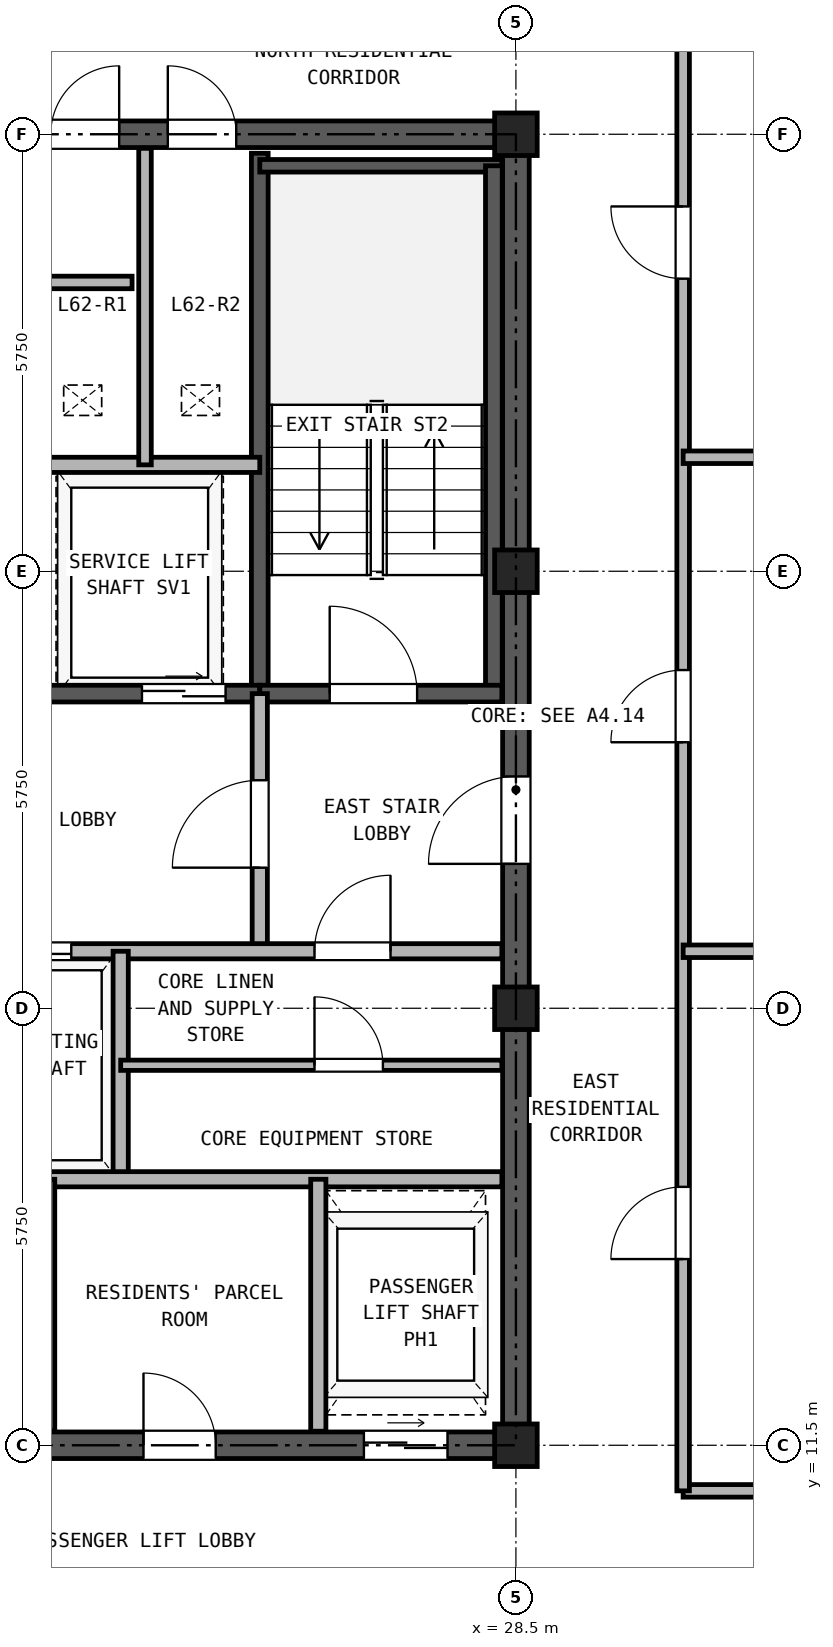
"""IFC4 building model, lengths in metres.
Left out: names, types, materials, properties, quantities, classifications, styles, units other than length and angle.
Written with IfcOpenShell. Run it as: python <this file> out.ifc"""

import sys

from ifc_helpers import new_model, si_unit, direction, frame, frame_2d, origin, origin_2d, place, context, subcontext, project, spatial, rectangle, hollow_rectangle, extrude, source, transform, mapped, element, fill, save


model = new_model("IFC4")
c1 = context("Model", 3, precision=1e-05, world=origin(), true_north=direction((0.0, 1.0)))
c2 = subcontext(c1, "Body", "Model", "MODEL_VIEW")
j1 = project(units=[si_unit("LENGTHUNIT", "METRE"), si_unit("PLANEANGLEUNIT", "RADIAN")], contexts=[c1])
p1 = place(None, origin())
s1 = spatial("IfcSite", under=j1, at=p1, CompositionType="ELEMENT")
p2 = place(p1, origin())
s2 = spatial("IfcBuilding", under=s1, at=p2, CompositionType="ELEMENT")
p3 = place(p2, frame((0.0, 0.0, 220.1)))
s3 = spatial("IfcBuildingStorey", under=s2, at=p3, CompositionType="ELEMENT", Elevation=220.1)
m1 = source(origin(), c2, "Body", "SweptSolid", [
    extrude(hollow_rectangle(XDim=0.56, YDim=0.56, WallThickness=0.03, at=origin_2d()), origin(), (0.0, 0.0, 1.0), 2.98),
])
for number, where, z_axis, x_axis in (
    (1, (28.5, 11.5, 0.0), (0.0, 0.0, 1.0), (1.0, 0.0, 0.0)),
    (2, (28.5, 17.25, 0.0), (0.0, 0.0, 1.0), (1.0, 0.0, 0.0)),
    (3, (28.5, 23.0, 0.0), (0.0, 0.0, 1.0), (1.0, 0.0, 0.0)),
    (4, (28.5, 28.75, 0.0), (0.0, 0.0, 1.0), (1.0, 0.0, 0.0)),
):
    element("IfcColumn", number, at=place(p3, frame(where, z_axis=z_axis, x_axis=x_axis)), inside=s3, PredefinedType="COLUMN", context=c2, shape_type="MappedRepresentation", body=[
        mapped(m1, transform((0.0, 0.0, 0.0), x_axis=(1.0, 0.0, 0.0), y_axis=(0.0, 1.0, 0.0), z_axis=(0.0, 0.0, 1.0), scale=1.0)),
    ])
p4 = place(p3, frame((18.325, 11.5, 0.0), z_axis=(0.0, 0.0, 1.0), x_axis=(1.0, 0.0, 0.0)))
e5 = element("IfcWall", 5, at=p4, inside=s3, PredefinedType="SHEAR", context=c2, shape_type="SweptSolid", body=[
    extrude(rectangle(XDim=10.35, YDim=0.35, at=frame_2d((5.175, 0.0))), origin(), (0.0, 0.0, 1.0), 2.98),
])
p5 = place(p4, frame((1.775, 0.0, 0.0)))
e6 = element("IfcOpeningElement", 6, at=p5, cuts=e5, PredefinedType="OPENING", context=c2, shape_type="SweptSolid", body=[
    extrude(rectangle(XDim=0.95, YDim=2.15, at=frame_2d((0.475, 1.075))), frame((0.0, 0.185, 0.0), z_axis=(0.0, -1.0, 0.0), x_axis=(1.0, 0.0, 0.0)), (0.0, 0.0, 1.0), 0.37),
])
p6 = place(p4, frame((5.275, 0.0, 0.0)))
e7 = element("IfcOpeningElement", 7, at=p6, cuts=e5, PredefinedType="OPENING", context=c2, shape_type="SweptSolid", body=[
    extrude(rectangle(XDim=0.95, YDim=2.15, at=frame_2d((0.475, 1.075))), frame((0.0, 0.185, 0.0), z_axis=(0.0, -1.0, 0.0), x_axis=(1.0, 0.0, 0.0)), (0.0, 0.0, 1.0), 0.37),
])
p7 = place(p4, frame((8.175, 0.0, 0.0)))
e8 = element("IfcOpeningElement", 8, at=p7, cuts=e5, PredefinedType="OPENING", context=c2, shape_type="SweptSolid", body=[
    extrude(rectangle(XDim=1.1, YDim=2.25, at=frame_2d((0.55, 1.125))), frame((0.0, 0.185, 0.0), z_axis=(0.0, -1.0, 0.0), x_axis=(1.0, 0.0, 0.0)), (0.0, 0.0, 1.0), 0.37),
])
p8 = place(p3, frame((18.325, 28.75, 0.0), z_axis=(0.0, 0.0, 1.0), x_axis=(1.0, 0.0, 0.0)))
e9 = element("IfcWall", 9, at=p8, inside=s3, PredefinedType="SHEAR", context=c2, shape_type="SweptSolid", body=[
    extrude(rectangle(XDim=10.35, YDim=0.35, at=frame_2d((5.175, 0.0))), origin(), (0.0, 0.0, 1.0), 2.98),
])
p9 = place(p8, frame((4.055, 0.0, 0.0)))
e10 = element("IfcOpeningElement", 10, at=p9, cuts=e9, PredefinedType="OPENING", context=c2, shape_type="SweptSolid", body=[
    extrude(rectangle(XDim=0.9, YDim=2.05, at=frame_2d((0.45, 1.025))), frame((0.0, 0.185, 0.0), z_axis=(0.0, -1.0, 0.0), x_axis=(1.0, 0.0, 0.0)), (0.0, 0.0, 1.0), 0.37),
])
p10 = place(p8, frame((5.595, 0.0, 0.0)))
e11 = element("IfcOpeningElement", 11, at=p10, cuts=e9, PredefinedType="OPENING", context=c2, shape_type="SweptSolid", body=[
    extrude(rectangle(XDim=0.9, YDim=2.05, at=frame_2d((0.45, 1.025))), frame((0.0, 0.185, 0.0), z_axis=(0.0, -1.0, 0.0), x_axis=(1.0, 0.0, 0.0)), (0.0, 0.0, 1.0), 0.37),
])
p11 = place(p3, frame((28.5, 11.675, 0.0), z_axis=(0.0, 0.0, 1.0), x_axis=(0.0, 1.0, 0.0)))
e12 = element("IfcWall", 12, at=p11, inside=s3, PredefinedType="SHEAR", context=c2, shape_type="SweptSolid", body=[
    extrude(rectangle(XDim=16.9, YDim=0.35, at=frame_2d((8.45, 0.0))), origin(), (0.0, 0.0, 1.0), 2.98),
])
p12 = place(p11, frame((7.475, 0.0, 0.0)))
e13 = element("IfcOpeningElement", 13, at=p12, cuts=e12, PredefinedType="OPENING", context=c2, shape_type="SweptSolid", body=[
    extrude(rectangle(XDim=1.15, YDim=2.2, at=frame_2d((0.575, 1.1))), frame((0.0, 0.185, 0.0), z_axis=(0.0, -1.0, 0.0), x_axis=(1.0, 0.0, 0.0)), (0.0, 0.0, 1.0), 0.37),
])
p13 = place(p3, frame((25.13, 21.39, 0.0), z_axis=(0.0, 0.0, 1.0), x_axis=(0.0, 1.0, 0.0)))
e14 = element("IfcWall", 14, at=p13, inside=s3, PredefinedType="SOLIDWALL", context=c2, shape_type="SweptSolid", body=[
    extrude(rectangle(XDim=7.11, YDim=0.22, at=frame_2d((3.555, 0.0))), origin(), (0.0, 0.0, 1.0), 2.98),
])
p14 = place(p3, frame((25.13, 28.335, 0.0), z_axis=(0.0, 0.0, 1.0), x_axis=(1.0, 0.0, 0.0)))
e15 = element("IfcWall", 15, at=p14, inside=s3, PredefinedType="PARTITIONING", context=c2, shape_type="SweptSolid", body=[
    extrude(rectangle(XDim=3.185, YDim=0.165, at=frame_2d((1.593, 0.0))), origin(), (0.0, 0.0, 1.0), 2.98),
])
p15 = place(p3, frame((28.21, 21.39, 0.0), z_axis=(0.0, 0.0, 1.0), x_axis=(0.0, 1.0, 0.0)))
e16 = element("IfcWall", 16, at=p15, inside=s3, PredefinedType="SOLIDWALL", context=c2, shape_type="SweptSolid", body=[
    extrude(rectangle(XDim=6.945, YDim=0.22, at=frame_2d((3.473, 0.0))), origin(), (0.0, 0.0, 1.0), 2.98),
])
p16 = place(p3, frame((18.685, 21.39, 0.0), z_axis=(0.0, 0.0, 1.0), x_axis=(1.0, 0.0, 0.0)))
e17 = element("IfcWall", 17, at=p16, inside=s3, PredefinedType="SOLIDWALL", context=c2, shape_type="SweptSolid", body=[
    extrude(rectangle(XDim=6.445, YDim=0.22, at=frame_2d((3.222, 0.0))), origin(), (0.0, 0.0, 1.0), 2.98),
])
p17 = place(p16, frame((1.165, 0.0, 0.0)))
e18 = element("IfcOpeningElement", 18, at=p17, cuts=e17, PredefinedType="OPENING", context=c2, shape_type="SweptSolid", body=[
    extrude(rectangle(XDim=1.15, YDim=2.2, at=frame_2d((0.575, 1.1))), frame((0.0, 0.12, 0.0), z_axis=(0.0, -1.0, 0.0), x_axis=(1.0, 0.0, 0.0)), (0.0, 0.0, 1.0), 0.24),
])
p18 = place(p16, frame((4.895, 0.0, 0.0)))
e19 = element("IfcOpeningElement", 19, at=p18, cuts=e17, PredefinedType="OPENING", context=c2, shape_type="SweptSolid", body=[
    extrude(rectangle(XDim=1.1, YDim=2.25, at=frame_2d((0.55, 1.125))), frame((0.0, 0.12, 0.0), z_axis=(0.0, -1.0, 0.0), x_axis=(1.0, 0.0, 0.0)), (0.0, 0.0, 1.0), 0.24),
])
p19 = place(p3, frame((25.13, 21.39, 0.0), z_axis=(0.0, 0.0, 1.0), x_axis=(1.0, 0.0, 0.0)))
e20 = element("IfcWall", 20, at=p19, inside=s3, PredefinedType="SOLIDWALL", context=c2, shape_type="SweptSolid", body=[
    extrude(rectangle(XDim=3.185, YDim=0.22, at=frame_2d((1.593, 0.0))), origin(), (0.0, 0.0, 1.0), 2.98),
])
p20 = place(p19, frame((0.92, 0.0, 0.0)))
e21 = element("IfcOpeningElement", 21, at=p20, cuts=e20, PredefinedType="OPENING", context=c2, shape_type="SweptSolid", body=[
    extrude(rectangle(XDim=1.15, YDim=2.2, at=frame_2d((0.575, 1.1))), frame((0.0, 0.12, 0.0), z_axis=(0.0, -1.0, 0.0), x_axis=(1.0, 0.0, 0.0)), (0.0, 0.0, 1.0), 0.24),
])
p21 = place(p3, frame((22.11, 24.4, 0.0), z_axis=(0.0, 0.0, 1.0), x_axis=(1.0, 0.0, 0.0)))
e22 = element("IfcWall", 22, at=p21, inside=s3, PredefinedType="PARTITIONING", context=c2, shape_type="SweptSolid", body=[
    extrude(rectangle(XDim=3.02, YDim=0.2, at=frame_2d((1.51, 0.0))), origin(), (0.0, 0.0, 1.0), 2.98),
])
p22 = place(p3, frame((23.62, 24.4, 0.0), z_axis=(0.0, 0.0, 1.0), x_axis=(0.0, 1.0, 0.0)))
e23 = element("IfcWall", 23, at=p22, inside=s3, PredefinedType="PARTITIONING", context=c2, shape_type="SweptSolid", body=[
    extrude(rectangle(XDim=4.165, YDim=0.165, at=frame_2d((2.083, 0.0))), origin(), (0.0, 0.0, 1.0), 2.98),
])
p23 = place(p3, frame((25.13, 18.0, 0.0), z_axis=(0.0, 0.0, 1.0), x_axis=(0.0, 1.0, 0.0)))
e24 = element("IfcWall", 24, at=p23, inside=s3, PredefinedType="PARTITIONING", context=c2, shape_type="SweptSolid", body=[
    extrude(rectangle(XDim=3.39, YDim=0.2, at=frame_2d((1.695, 0.0))), origin(), (0.0, 0.0, 1.0), 2.98),
])
p24 = place(p23, frame((1.1, 0.0, 0.0)))
e25 = element("IfcOpeningElement", 25, at=p24, cuts=e24, PredefinedType="OPENING", context=c2, shape_type="SweptSolid", body=[
    extrude(rectangle(XDim=1.15, YDim=2.2, at=frame_2d((0.575, 1.1))), frame((0.0, 0.11, 0.0), z_axis=(0.0, -1.0, 0.0), x_axis=(1.0, 0.0, 0.0)), (0.0, 0.0, 1.0), 0.22),
])
p25 = place(p3, frame((18.685, 18.0, 0.0), z_axis=(0.0, 0.0, 1.0), x_axis=(1.0, 0.0, 0.0)))
e26 = element("IfcWall", 26, at=p25, inside=s3, PredefinedType="PARTITIONING", context=c2, shape_type="SweptSolid", body=[
    extrude(rectangle(XDim=9.63, YDim=0.2, at=frame_2d((4.815, 0.0))), origin(), (0.0, 0.0, 1.0), 2.98),
])
p26 = place(p25, frame((0.565, 0.0, 0.0)))
e27 = element("IfcOpeningElement", 27, at=p26, cuts=e26, PredefinedType="OPENING", context=c2, shape_type="SweptSolid", body=[
    extrude(rectangle(XDim=1.3, YDim=2.3, at=frame_2d((0.65, 1.15))), frame((0.0, 0.11, 0.0), z_axis=(0.0, -1.0, 0.0), x_axis=(1.0, 0.0, 0.0)), (0.0, 0.0, 1.0), 0.22),
])
p27 = place(p25, frame((2.665, 0.0, 0.0)))
e28 = element("IfcOpeningElement", 28, at=p27, cuts=e26, PredefinedType="OPENING", context=c2, shape_type="SweptSolid", body=[
    extrude(rectangle(XDim=1.3, YDim=2.3, at=frame_2d((0.65, 1.15))), frame((0.0, 0.11, 0.0), z_axis=(0.0, -1.0, 0.0), x_axis=(1.0, 0.0, 0.0)), (0.0, 0.0, 1.0), 0.22),
])
p28 = place(p25, frame((7.165, 0.0, 0.0)))
e29 = element("IfcOpeningElement", 29, at=p28, cuts=e26, PredefinedType="OPENING", context=c2, shape_type="SweptSolid", body=[
    extrude(rectangle(XDim=1.0, YDim=2.15, at=frame_2d((0.5, 1.075))), frame((0.0, 0.11, 0.0), z_axis=(0.0, -1.0, 0.0), x_axis=(1.0, 0.0, 0.0)), (0.0, 0.0, 1.0), 0.22),
])
p29 = place(p3, frame((23.3, 15.0, 0.0), z_axis=(0.0, 0.0, 1.0), x_axis=(0.0, 1.0, 0.0)))
e30 = element("IfcWall", 30, at=p29, inside=s3, PredefinedType="PARTITIONING", context=c2, shape_type="SweptSolid", body=[
    extrude(rectangle(XDim=3.0, YDim=0.2, at=frame_2d((1.5, 0.0))), origin(), (0.0, 0.0, 1.0), 2.98),
])
p30 = place(p3, frame((18.685, 15.0, 0.0), z_axis=(0.0, 0.0, 1.0), x_axis=(1.0, 0.0, 0.0)))
e31 = element("IfcWall", 31, at=p30, inside=s3, PredefinedType="PARTITIONING", context=c2, shape_type="SweptSolid", body=[
    extrude(rectangle(XDim=9.63, YDim=0.2, at=frame_2d((4.815, 0.0))), origin(), (0.0, 0.0, 1.0), 2.98),
])
p31 = place(p3, frame((23.3, 16.5, 0.0), z_axis=(0.0, 0.0, 1.0), x_axis=(1.0, 0.0, 0.0)))
e32 = element("IfcWall", 32, at=p31, inside=s3, PredefinedType="PARTITIONING", context=c2, shape_type="SweptSolid", body=[
    extrude(rectangle(XDim=5.015, YDim=0.135, at=frame_2d((2.507, 0.0))), origin(), (0.0, 0.0, 1.0), 2.98),
])
p32 = place(p31, frame((2.55, 0.0, 0.0)))
e33 = element("IfcOpeningElement", 33, at=p32, cuts=e32, PredefinedType="OPENING", context=c2, shape_type="SweptSolid", body=[
    extrude(rectangle(XDim=0.9, YDim=2.05, at=frame_2d((0.45, 1.025))), frame((0.0, 0.077, 0.0), z_axis=(0.0, -1.0, 0.0), x_axis=(1.0, 0.0, 0.0)), (0.0, 0.0, 1.0), 0.155),
])
p33 = place(p3, frame((22.35, 11.685, 0.0), z_axis=(0.0, 0.0, 1.0), x_axis=(0.0, 1.0, 0.0)))
e34 = element("IfcWall", 34, at=p33, inside=s3, PredefinedType="PARTITIONING", context=c2, shape_type="SweptSolid", body=[
    extrude(rectangle(XDim=3.315, YDim=0.165, at=frame_2d((1.657, 0.0))), origin(), (0.0, 0.0, 1.0), 2.98),
])
p34 = place(p3, frame((25.9, 11.685, 0.0), z_axis=(0.0, 0.0, 1.0), x_axis=(0.0, 1.0, 0.0)))
e35 = element("IfcWall", 35, at=p34, inside=s3, PredefinedType="PARTITIONING", context=c2, shape_type="SweptSolid", body=[
    extrude(rectangle(XDim=3.315, YDim=0.2, at=frame_2d((1.657, 0.0))), origin(), (0.0, 0.0, 1.0), 2.98),
])
p35 = place(p3, frame((30.7, 10.9, 0.0), z_axis=(0.0, 0.0, 1.0), x_axis=(1.0, 0.0, 0.0)))
e36 = element("IfcWall", 36, at=p35, inside=s3, PredefinedType="PARTITIONING", context=c2, shape_type="SweptSolid", body=[
    extrude(rectangle(XDim=7.5, YDim=0.165, at=frame_2d((3.75, 0.0))), origin(), (0.0, 0.0, 1.0), 2.98),
])
p36 = place(p3, frame((30.7, 10.9, 0.0), z_axis=(0.0, 0.0, 1.0), x_axis=(0.0, 1.0, 0.0)))
e37 = element("IfcWall", 37, at=p36, inside=s3, PredefinedType="PARTITIONING", context=c2, shape_type="SweptSolid", body=[
    extrude(rectangle(XDim=24.24, YDim=0.165, at=frame_2d((12.12, 0.0))), origin(), (0.0, 0.0, 1.0), 2.98),
])
p37 = place(p36, frame((3.05, 0.0, 0.0)))
e38 = element("IfcOpeningElement", 38, at=p37, cuts=e37, PredefinedType="OPENING", context=c2, shape_type="SweptSolid", body=[
    extrude(rectangle(XDim=0.95, YDim=2.15, at=frame_2d((0.475, 1.075))), frame((0.0, 0.093, 0.0), z_axis=(0.0, -1.0, 0.0), x_axis=(1.0, 0.0, 0.0)), (0.0, 0.0, 1.0), 0.185),
])
p38 = place(p36, frame((9.85, 0.0, 0.0)))
e39 = element("IfcOpeningElement", 39, at=p38, cuts=e37, PredefinedType="OPENING", context=c2, shape_type="SweptSolid", body=[
    extrude(rectangle(XDim=0.95, YDim=2.15, at=frame_2d((0.475, 1.075))), frame((0.0, 0.093, 0.0), z_axis=(0.0, -1.0, 0.0), x_axis=(1.0, 0.0, 0.0)), (0.0, 0.0, 1.0), 0.185),
])
p39 = place(p36, frame((15.95, 0.0, 0.0)))
e40 = element("IfcOpeningElement", 40, at=p39, cuts=e37, PredefinedType="OPENING", context=c2, shape_type="SweptSolid", body=[
    extrude(rectangle(XDim=0.95, YDim=2.15, at=frame_2d((0.475, 1.075))), frame((0.0, 0.093, 0.0), z_axis=(0.0, -1.0, 0.0), x_axis=(1.0, 0.0, 0.0)), (0.0, 0.0, 1.0), 0.185),
])
p40 = place(p36, frame((21.27, 0.0, 0.0)))
e41 = element("IfcOpeningElement", 41, at=p40, cuts=e37, PredefinedType="OPENING", context=c2, shape_type="SweptSolid", body=[
    extrude(rectangle(XDim=0.95, YDim=2.15, at=frame_2d((0.475, 1.075))), frame((0.0, 0.093, 0.0), z_axis=(0.0, -1.0, 0.0), x_axis=(1.0, 0.0, 0.0)), (0.0, 0.0, 1.0), 0.185),
])
for number, where, z_axis, x_axis in (
    (42, (30.7, 18.0, 0.0), (0.0, 0.0, 1.0), (1.0, 0.0, 0.0)),
    (43, (30.7, 24.5, 0.0), (0.0, 0.0, 1.0), (1.0, 0.0, 0.0)),
):
    element("IfcWall", number, at=place(p3, frame(where, z_axis=z_axis, x_axis=x_axis)), inside=s3, PredefinedType="PARTITIONING", context=c2, shape_type="SweptSolid", body=[
        extrude(rectangle(XDim=10.94, YDim=0.165, at=frame_2d((5.47, 0.0))), origin(), (0.0, 0.0, 1.0), 2.98),
    ])
p41 = place(p3, frame((22.35, 26.8, 0.0), z_axis=(0.0, 0.0, 1.0), x_axis=(1.0, 0.0, 0.0)))
e44 = element("IfcWall", 44, at=p41, inside=s3, PredefinedType="PARTITIONING", context=c2, shape_type="SweptSolid", body=[
    extrude(rectangle(XDim=1.1, YDim=0.165, at=frame_2d((0.55, 0.0))), origin(), (0.0, 0.0, 1.0), 2.98),
])
p42 = place(p20, frame((1.15, 0.0, 0.0), z_axis=(0.0, 0.0, 1.0), x_axis=(-1.0, 0.0, 0.0)))
e45 = element("IfcDoor", 45, at=p42, inside=s3, OperationType="SINGLE_SWING_LEFT", PredefinedType="DOOR", context=c2, shape_type="SweptSolid", body=[
    extrude(rectangle(XDim=1.15, YDim=2.2, at=frame_2d((0.575, 1.1))), frame((0.0, 0.025, 0.0), z_axis=(0.0, -1.0, 0.0), x_axis=(1.0, 0.0, 0.0)), (0.0, 0.0, 1.0), 0.05),
])
fill(e21, e45)
p43 = place(p18, frame((1.1, 0.0, 0.0), z_axis=(0.0, 0.0, 1.0), x_axis=(-1.0, 0.0, 0.0)))
e46 = element("IfcDoor", 46, at=p43, inside=s3, OperationType="DOUBLE_DOOR_SLIDING", PredefinedType="DOOR", context=c2, shape_type="SweptSolid", body=[
    extrude(rectangle(XDim=1.1, YDim=2.25, at=frame_2d((0.55, 1.125))), frame((0.0, 0.025, 0.0), z_axis=(0.0, -1.0, 0.0), x_axis=(1.0, 0.0, 0.0)), (0.0, 0.0, 1.0), 0.05),
])
fill(e19, e46)
p44 = place(p24, origin())
e47 = element("IfcDoor", 47, at=p44, inside=s3, OperationType="SINGLE_SWING_LEFT", PredefinedType="DOOR", context=c2, shape_type="SweptSolid", body=[
    extrude(rectangle(XDim=1.15, YDim=2.2, at=frame_2d((0.575, 1.1))), frame((0.0, 0.025, 0.0), z_axis=(0.0, -1.0, 0.0), x_axis=(1.0, 0.0, 0.0)), (0.0, 0.0, 1.0), 0.05),
])
fill(e25, e47)
p45 = place(p27, origin())
e48 = element("IfcDoor", 48, at=p45, inside=s3, OperationType="DOUBLE_DOOR_SLIDING", PredefinedType="DOOR", context=c2, shape_type="SweptSolid", body=[
    extrude(rectangle(XDim=1.3, YDim=2.3, at=frame_2d((0.65, 1.15))), frame((0.0, 0.025, 0.0), z_axis=(0.0, -1.0, 0.0), x_axis=(1.0, 0.0, 0.0)), (0.0, 0.0, 1.0), 0.05),
])
fill(e28, e48)
p46 = place(p28, frame((1.0, 0.0, 0.0), z_axis=(0.0, 0.0, 1.0), x_axis=(-1.0, 0.0, 0.0)))
e49 = element("IfcDoor", 49, at=p46, inside=s3, OperationType="SINGLE_SWING_RIGHT", PredefinedType="DOOR", context=c2, shape_type="SweptSolid", body=[
    extrude(rectangle(XDim=1.0, YDim=2.15, at=frame_2d((0.5, 1.075))), frame((0.0, 0.025, 0.0), z_axis=(0.0, -1.0, 0.0), x_axis=(1.0, 0.0, 0.0)), (0.0, 0.0, 1.0), 0.05),
])
fill(e29, e49)
p47 = place(p32, frame((0.9, 0.0, 0.0), z_axis=(0.0, 0.0, 1.0), x_axis=(-1.0, 0.0, 0.0)))
e50 = element("IfcDoor", 50, at=p47, inside=s3, OperationType="SINGLE_SWING_LEFT", PredefinedType="DOOR", context=c2, shape_type="SweptSolid", body=[
    extrude(rectangle(XDim=0.9, YDim=2.05, at=frame_2d((0.45, 1.025))), frame((0.0, 0.025, 0.0), z_axis=(0.0, -1.0, 0.0), x_axis=(1.0, 0.0, 0.0)), (0.0, 0.0, 1.0), 0.05),
])
fill(e33, e50)
p48 = place(p12, origin())
e51 = element("IfcDoor", 51, at=p48, inside=s3, OperationType="SINGLE_SWING_LEFT", PredefinedType="DOOR", context=c2, shape_type="SweptSolid", body=[
    extrude(rectangle(XDim=1.15, YDim=2.2, at=frame_2d((0.575, 1.1))), frame((0.0, 0.025, 0.0), z_axis=(0.0, -1.0, 0.0), x_axis=(1.0, 0.0, 0.0)), (0.0, 0.0, 1.0), 0.05),
])
fill(e13, e51)
p49 = place(p9, origin())
e52 = element("IfcDoor", 52, at=p49, inside=s3, OperationType="SINGLE_SWING_RIGHT", PredefinedType="DOOR", context=c2, shape_type="SweptSolid", body=[
    extrude(rectangle(XDim=0.9, YDim=2.05, at=frame_2d((0.45, 1.025))), frame((0.0, 0.025, 0.0), z_axis=(0.0, -1.0, 0.0), x_axis=(1.0, 0.0, 0.0)), (0.0, 0.0, 1.0), 0.05),
])
fill(e10, e52)
p50 = place(p10, origin())
e53 = element("IfcDoor", 53, at=p50, inside=s3, OperationType="SINGLE_SWING_LEFT", PredefinedType="DOOR", context=c2, shape_type="SweptSolid", body=[
    extrude(rectangle(XDim=0.9, YDim=2.05, at=frame_2d((0.45, 1.025))), frame((0.0, 0.025, 0.0), z_axis=(0.0, -1.0, 0.0), x_axis=(1.0, 0.0, 0.0)), (0.0, 0.0, 1.0), 0.05),
])
fill(e11, e53)
p51 = place(p6, frame((0.95, 0.0, 0.0), z_axis=(0.0, 0.0, 1.0), x_axis=(-1.0, 0.0, 0.0)))
e54 = element("IfcDoor", 54, at=p51, inside=s3, OperationType="SINGLE_SWING_LEFT", PredefinedType="DOOR", context=c2, shape_type="SweptSolid", body=[
    extrude(rectangle(XDim=0.95, YDim=2.15, at=frame_2d((0.475, 1.075))), frame((0.0, 0.025, 0.0), z_axis=(0.0, -1.0, 0.0), x_axis=(1.0, 0.0, 0.0)), (0.0, 0.0, 1.0), 0.05),
])
fill(e7, e54)
p52 = place(p7, frame((1.1, 0.0, 0.0), z_axis=(0.0, 0.0, 1.0), x_axis=(-1.0, 0.0, 0.0)))
e55 = element("IfcDoor", 55, at=p52, inside=s3, OperationType="DOUBLE_DOOR_SLIDING", PredefinedType="DOOR", context=c2, shape_type="SweptSolid", body=[
    extrude(rectangle(XDim=1.1, YDim=2.25, at=frame_2d((0.55, 1.125))), frame((0.0, 0.025, 0.0), z_axis=(0.0, -1.0, 0.0), x_axis=(1.0, 0.0, 0.0)), (0.0, 0.0, 1.0), 0.05),
])
fill(e8, e55)
p53 = place(p37, origin())
e56 = element("IfcDoor", 56, at=p53, inside=s3, OperationType="SINGLE_SWING_LEFT", PredefinedType="DOOR", context=c2, shape_type="SweptSolid", body=[
    extrude(rectangle(XDim=0.95, YDim=2.15, at=frame_2d((0.475, 1.075))), frame((0.0, 0.025, 0.0), z_axis=(0.0, -1.0, 0.0), x_axis=(1.0, 0.0, 0.0)), (0.0, 0.0, 1.0), 0.05),
])
fill(e38, e56)
p54 = place(p38, origin())
e57 = element("IfcDoor", 57, at=p54, inside=s3, OperationType="SINGLE_SWING_LEFT", PredefinedType="DOOR", context=c2, shape_type="SweptSolid", body=[
    extrude(rectangle(XDim=0.95, YDim=2.15, at=frame_2d((0.475, 1.075))), frame((0.0, 0.025, 0.0), z_axis=(0.0, -1.0, 0.0), x_axis=(1.0, 0.0, 0.0)), (0.0, 0.0, 1.0), 0.05),
])
fill(e39, e57)
p55 = place(p39, origin())
e58 = element("IfcDoor", 58, at=p55, inside=s3, OperationType="SINGLE_SWING_RIGHT", PredefinedType="DOOR", context=c2, shape_type="SweptSolid", body=[
    extrude(rectangle(XDim=0.95, YDim=2.15, at=frame_2d((0.475, 1.075))), frame((0.0, 0.025, 0.0), z_axis=(0.0, -1.0, 0.0), x_axis=(1.0, 0.0, 0.0)), (0.0, 0.0, 1.0), 0.05),
])
fill(e40, e58)
save(model, sys.argv[1])
